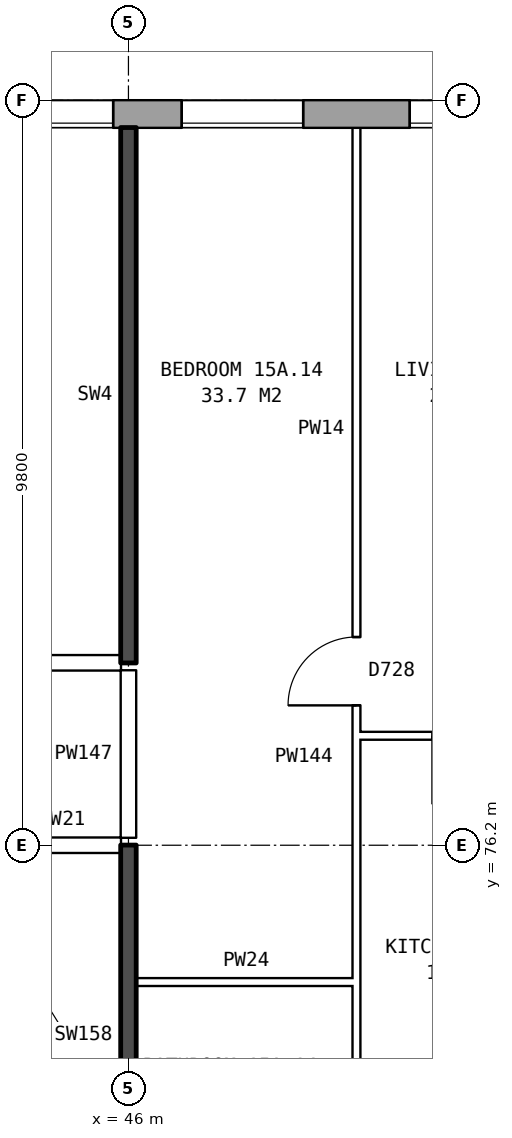
"""IFC4 building model, lengths in metres.
Left out: names, types, materials, properties, quantities, classifications, styles, units other than length and angle.
Written with IfcOpenShell. Run it as: python <this file> out.ifc"""

import sys

from ifc_helpers import new_model, si_unit, direction, frame, frame_2d, origin, place, context, subcontext, project, spatial, rectangle, extrude, element, fill, save


model = new_model("IFC4")
c1 = context("Model", 3, precision=1e-05, world=origin(), true_north=direction((0.0, 1.0)))
c2 = subcontext(c1, "Body", "Model", "MODEL_VIEW")
j1 = project(units=[si_unit("LENGTHUNIT", "METRE"), si_unit("PLANEANGLEUNIT", "RADIAN")], contexts=[c1])
p1 = place(None, origin())
s1 = spatial("IfcSite", under=j1, at=p1, CompositionType="ELEMENT")
p2 = place(p1, origin())
s2 = spatial("IfcBuilding", under=s1, at=p2, CompositionType="ELEMENT")
p3 = place(p2, frame((0.0, 0.0, 56.7)))
s3 = spatial("IfcBuildingStorey", under=s2, at=p3, CompositionType="ELEMENT", Elevation=56.7)
p4 = place(p3, frame((72.925, 85.82, 0.0), z_axis=(0.0, 0.0, 1.0), x_axis=(-1.0, 0.0, 0.0)))
e1 = element("IfcWall", 1, at=p4, inside=s3, PredefinedType="STANDARD", context=c2, shape_type="SweptSolid", body=[
    extrude(rectangle(XDim=48.351, YDim=0.36, at=frame_2d((24.175, 0.0))), origin(), (0.0, 0.0, 1.0), 2.85),
])
p5 = place(p4, frame((0.625, 0.0, 0.8)))
e2 = element("IfcOpeningElement", 2, at=p5, cuts=e1, PredefinedType="OPENING", context=c2, shape_type="SweptSolid", body=[
    extrude(rectangle(XDim=1.6, YDim=1.8, at=frame_2d((0.8, 0.9))), frame((0.0, 0.19, 0.0), z_axis=(0.0, -1.0, 0.0), x_axis=(1.0, 0.0, 0.0)), (0.0, 0.0, 1.0), 0.38),
])
p6 = place(p4, frame((3.625, 0.0, 0.8)))
e3 = element("IfcOpeningElement", 3, at=p6, cuts=e1, PredefinedType="OPENING", context=c2, shape_type="SweptSolid", body=[
    extrude(rectangle(XDim=1.6, YDim=1.8, at=frame_2d((0.8, 0.9))), frame((0.0, 0.19, 0.0), z_axis=(0.0, -1.0, 0.0), x_axis=(1.0, 0.0, 0.0)), (0.0, 0.0, 1.0), 0.38),
])
p7 = place(p4, frame((6.625, 0.0, 0.8)))
e4 = element("IfcOpeningElement", 4, at=p7, cuts=e1, PredefinedType="OPENING", context=c2, shape_type="SweptSolid", body=[
    extrude(rectangle(XDim=1.6, YDim=1.8, at=frame_2d((0.8, 0.9))), frame((0.0, 0.19, 0.0), z_axis=(0.0, -1.0, 0.0), x_axis=(1.0, 0.0, 0.0)), (0.0, 0.0, 1.0), 0.38),
])
p8 = place(p4, frame((9.625, 0.0, 0.8)))
e5 = element("IfcOpeningElement", 5, at=p8, cuts=e1, PredefinedType="OPENING", context=c2, shape_type="SweptSolid", body=[
    extrude(rectangle(XDim=1.6, YDim=1.8, at=frame_2d((0.8, 0.9))), frame((0.0, 0.19, 0.0), z_axis=(0.0, -1.0, 0.0), x_axis=(1.0, 0.0, 0.0)), (0.0, 0.0, 1.0), 0.38),
])
p9 = place(p4, frame((12.625, 0.0, 0.8)))
e6 = element("IfcOpeningElement", 6, at=p9, cuts=e1, PredefinedType="OPENING", context=c2, shape_type="SweptSolid", body=[
    extrude(rectangle(XDim=1.6, YDim=1.8, at=frame_2d((0.8, 0.9))), frame((0.0, 0.19, 0.0), z_axis=(0.0, -1.0, 0.0), x_axis=(1.0, 0.0, 0.0)), (0.0, 0.0, 1.0), 0.38),
])
p10 = place(p4, frame((15.125, 0.0, 0.8)))
e7 = element("IfcOpeningElement", 7, at=p10, cuts=e1, PredefinedType="OPENING", context=c2, shape_type="SweptSolid", body=[
    extrude(rectangle(XDim=1.0, YDim=1.8, at=frame_2d((0.5, 0.9))), frame((0.0, 0.19, 0.0), z_axis=(0.0, -1.0, 0.0), x_axis=(1.0, 0.0, 0.0)), (0.0, 0.0, 1.0), 0.38),
])
p11 = place(p4, frame((18.625, 0.0, 0.65)))
e8 = element("IfcOpeningElement", 8, at=p11, cuts=e1, PredefinedType="OPENING", context=c2, shape_type="SweptSolid", body=[
    extrude(rectangle(XDim=0.8, YDim=0.9, at=frame_2d((0.4, 0.45))), frame((0.0, 0.19, 0.0), z_axis=(0.0, -1.0, 0.0), x_axis=(1.0, 0.0, 0.0)), (0.0, 0.0, 1.0), 0.38),
])
p12 = place(p4, frame((21.625, 0.0, 0.8)))
e9 = element("IfcOpeningElement", 9, at=p12, cuts=e1, PredefinedType="OPENING", context=c2, shape_type="SweptSolid", body=[
    extrude(rectangle(XDim=1.6, YDim=1.8, at=frame_2d((0.8, 0.9))), frame((0.0, 0.19, 0.0), z_axis=(0.0, -1.0, 0.0), x_axis=(1.0, 0.0, 0.0)), (0.0, 0.0, 1.0), 0.38),
])
p13 = place(p4, frame((24.625, 0.0, 0.8)))
e10 = element("IfcOpeningElement", 10, at=p13, cuts=e1, PredefinedType="OPENING", context=c2, shape_type="SweptSolid", body=[
    extrude(rectangle(XDim=1.6, YDim=1.8, at=frame_2d((0.8, 0.9))), frame((0.0, 0.19, 0.0), z_axis=(0.0, -1.0, 0.0), x_axis=(1.0, 0.0, 0.0)), (0.0, 0.0, 1.0), 0.38),
])
p14 = place(p4, frame((27.125, 0.0, 0.8)))
e11 = element("IfcOpeningElement", 11, at=p14, cuts=e1, PredefinedType="OPENING", context=c2, shape_type="SweptSolid", body=[
    extrude(rectangle(XDim=1.0, YDim=1.8, at=frame_2d((0.5, 0.9))), frame((0.0, 0.19, 0.0), z_axis=(0.0, -1.0, 0.0), x_axis=(1.0, 0.0, 0.0)), (0.0, 0.0, 1.0), 0.38),
])
p15 = place(p4, frame((28.425, 0.0, 0.8)))
e12 = element("IfcOpeningElement", 12, at=p15, cuts=e1, PredefinedType="OPENING", context=c2, shape_type="SweptSolid", body=[
    extrude(rectangle(XDim=1.0, YDim=0.9, at=frame_2d((0.5, 0.45))), frame((0.0, 0.19, 0.0), z_axis=(0.0, -1.0, 0.0), x_axis=(1.0, 0.0, 0.0)), (0.0, 0.0, 1.0), 0.38),
])
p16 = place(p4, frame((33.625, 0.0, 0.8)))
e13 = element("IfcOpeningElement", 13, at=p16, cuts=e1, PredefinedType="OPENING", context=c2, shape_type="SweptSolid", body=[
    extrude(rectangle(XDim=1.6, YDim=1.8, at=frame_2d((0.8, 0.9))), frame((0.0, 0.19, 0.0), z_axis=(0.0, -1.0, 0.0), x_axis=(1.0, 0.0, 0.0)), (0.0, 0.0, 1.0), 0.38),
])
p17 = place(p4, frame((36.625, 0.0, 0.8)))
e14 = element("IfcOpeningElement", 14, at=p17, cuts=e1, PredefinedType="OPENING", context=c2, shape_type="SweptSolid", body=[
    extrude(rectangle(XDim=1.6, YDim=1.8, at=frame_2d((0.8, 0.9))), frame((0.0, 0.19, 0.0), z_axis=(0.0, -1.0, 0.0), x_axis=(1.0, 0.0, 0.0)), (0.0, 0.0, 1.0), 0.38),
])
p18 = place(p4, frame((39.625, 0.0, 0.8)))
e15 = element("IfcOpeningElement", 15, at=p18, cuts=e1, PredefinedType="OPENING", context=c2, shape_type="SweptSolid", body=[
    extrude(rectangle(XDim=1.6, YDim=1.8, at=frame_2d((0.8, 0.9))), frame((0.0, 0.19, 0.0), z_axis=(0.0, -1.0, 0.0), x_axis=(1.0, 0.0, 0.0)), (0.0, 0.0, 1.0), 0.38),
])
p19 = place(p4, frame((42.625, 0.0, 0.8)))
e16 = element("IfcOpeningElement", 16, at=p19, cuts=e1, PredefinedType="OPENING", context=c2, shape_type="SweptSolid", body=[
    extrude(rectangle(XDim=1.6, YDim=1.8, at=frame_2d((0.8, 0.9))), frame((0.0, 0.19, 0.0), z_axis=(0.0, -1.0, 0.0), x_axis=(1.0, 0.0, 0.0)), (0.0, 0.0, 1.0), 0.38),
])
p20 = place(p4, frame((45.625, 0.0, 0.8)))
e17 = element("IfcOpeningElement", 17, at=p20, cuts=e1, PredefinedType="OPENING", context=c2, shape_type="SweptSolid", body=[
    extrude(rectangle(XDim=1.6, YDim=1.8, at=frame_2d((0.8, 0.9))), frame((0.0, 0.19, 0.0), z_axis=(0.0, -1.0, 0.0), x_axis=(1.0, 0.0, 0.0)), (0.0, 0.0, 1.0), 0.38),
])
p21 = place(p4, frame((16.425, 0.0, 1.7)))
e18 = element("IfcOpeningElement", 18, at=p21, cuts=e1, PredefinedType="OPENING", context=c2, shape_type="SweptSolid", body=[
    extrude(rectangle(XDim=1.0, YDim=0.9, at=frame_2d((0.5, 0.45))), frame((0.0, 0.19, 0.0), z_axis=(0.0, -1.0, 0.0), x_axis=(1.0, 0.0, 0.0)), (0.0, 0.0, 1.0), 0.38),
])
p22 = place(p4, frame((19.725, 0.0, 0.75)))
e19 = element("IfcOpeningElement", 19, at=p22, cuts=e1, PredefinedType="OPENING", context=c2, shape_type="SweptSolid", body=[
    extrude(rectangle(XDim=1.0, YDim=1.5, at=frame_2d((0.5, 0.75))), frame((0.0, 0.19, 0.0), z_axis=(0.0, -1.0, 0.0), x_axis=(1.0, 0.0, 0.0)), (0.0, 0.0, 1.0), 0.38),
])
p23 = place(p4, frame((30.875, 0.0, 1.7)))
e20 = element("IfcOpeningElement", 20, at=p23, cuts=e1, PredefinedType="OPENING", context=c2, shape_type="SweptSolid", body=[
    extrude(rectangle(XDim=0.6, YDim=0.9, at=frame_2d((0.3, 0.45))), frame((0.0, 0.19, 0.0), z_axis=(0.0, -1.0, 0.0), x_axis=(1.0, 0.0, 0.0)), (0.0, 0.0, 1.0), 0.38),
])
p24 = place(p4, frame((31.775, 0.0, 1.1)))
e21 = element("IfcOpeningElement", 21, at=p24, cuts=e1, PredefinedType="OPENING", context=c2, shape_type="SweptSolid", body=[
    extrude(rectangle(XDim=0.8, YDim=1.5, at=frame_2d((0.4, 0.75))), frame((0.0, 0.19, 0.0), z_axis=(0.0, -1.0, 0.0), x_axis=(1.0, 0.0, 0.0)), (0.0, 0.0, 1.0), 0.38),
])
p25 = place(p3, frame((46.1, 74.4, 0.0), z_axis=(0.0, 0.0, 1.0), x_axis=(1.0, 0.0, 0.0)))
e22 = element("IfcWall", 22, at=p25, inside=s3, PredefinedType="PARTITIONING", context=c2, shape_type="SweptSolid", body=[
    extrude(rectangle(XDim=2.9, YDim=0.1, at=frame_2d((1.45, 0.0))), origin(), (0.0, 0.0, 1.0), 2.85),
])
p26 = place(p3, frame((44.36, 76.2, 0.0), z_axis=(0.0, 0.0, 1.0), x_axis=(1.0, 0.0, 0.0)))
e23 = element("IfcWall", 23, at=p26, inside=s3, PredefinedType="PARTITIONING", context=c2, shape_type="SweptSolid", body=[
    extrude(rectangle(XDim=1.54, YDim=0.2, at=frame_2d((0.77, 0.0))), origin(), (0.0, 0.0, 1.0), 2.85),
])
p27 = place(p3, frame((49.0, 77.64, 0.0), z_axis=(0.0, 0.0, 1.0), x_axis=(1.0, 0.0, 0.0)))
e24 = element("IfcWall", 24, at=p27, inside=s3, PredefinedType="PARTITIONING", context=c2, shape_type="SweptSolid", body=[
    extrude(rectangle(XDim=2.9, YDim=0.1, at=frame_2d((1.45, 0.0))), origin(), (0.0, 0.0, 1.0), 2.85),
])
p28 = place(p27, frame((1.0, 0.0, 0.0)))
e25 = element("IfcOpeningElement", 25, at=p28, cuts=e24, PredefinedType="OPENING", context=c2, shape_type="SweptSolid", body=[
    extrude(rectangle(XDim=0.9, YDim=2.1, at=frame_2d((0.45, 1.05))), frame((0.0, 0.06, 0.0), z_axis=(0.0, -1.0, 0.0), x_axis=(1.0, 0.0, 0.0)), (0.0, 0.0, 1.0), 0.12),
])
p29 = place(p3, frame((21.86, 78.6, 0.0), z_axis=(0.0, 0.0, 1.0), x_axis=(1.0, 0.0, 0.0)))
e26 = element("IfcWall", 26, at=p29, inside=s3, PredefinedType="PARTITIONING", context=c2, shape_type="SweptSolid", body=[
    extrude(rectangle(XDim=24.04, YDim=0.2, at=frame_2d((12.02, 0.0))), origin(), (0.0, 0.0, 1.0), 2.85),
])
p30 = place(p29, frame((20.59, 0.0, 0.0)))
e27 = element("IfcOpeningElement", 27, at=p30, cuts=e26, PredefinedType="OPENING", context=c2, shape_type="SweptSolid", body=[
    extrude(rectangle(XDim=1.0, YDim=2.1, at=frame_2d((0.5, 1.05))), frame((0.0, 0.11, 0.0), z_axis=(0.0, -1.0, 0.0), x_axis=(1.0, 0.0, 0.0)), (0.0, 0.0, 1.0), 0.22),
])
p31 = place(p29, frame((8.64, 0.0, 0.0)))
e28 = element("IfcOpeningElement", 28, at=p31, cuts=e26, PredefinedType="OPENING", context=c2, shape_type="SweptSolid", body=[
    extrude(rectangle(XDim=1.0, YDim=2.1, at=frame_2d((0.5, 1.05))), frame((0.0, 0.11, 0.0), z_axis=(0.0, -1.0, 0.0), x_axis=(1.0, 0.0, 0.0)), (0.0, 0.0, 1.0), 0.22),
])
p32 = place(p29, frame((3.64, 0.0, 0.0)))
e29 = element("IfcOpeningElement", 29, at=p32, cuts=e26, PredefinedType="OPENING", context=c2, shape_type="SweptSolid", body=[
    extrude(rectangle(XDim=1.0, YDim=2.1, at=frame_2d((0.5, 1.05))), frame((0.0, 0.11, 0.0), z_axis=(0.0, -1.0, 0.0), x_axis=(1.0, 0.0, 0.0)), (0.0, 0.0, 1.0), 0.22),
])
p33 = place(p3, frame((46.0, 71.2, 0.0), z_axis=(0.0, 0.0, 1.0), x_axis=(0.0, 1.0, 0.0)))
e30 = element("IfcWall", 30, at=p33, inside=s3, PredefinedType="SOLIDWALL", context=c2, shape_type="SweptSolid", body=[
    extrude(rectangle(XDim=5.0, YDim=0.2, at=frame_2d((2.5, 0.0))), origin(), (0.0, 0.0, 1.0), 2.85),
])
p34 = place(p3, frame((46.0, 76.3, 0.0), z_axis=(0.0, 0.0, 1.0), x_axis=(0.0, 1.0, 0.0)))
e31 = element("IfcWall", 31, at=p34, inside=s3, PredefinedType="PARTITIONING", context=c2, shape_type="SweptSolid", body=[
    extrude(rectangle(XDim=2.2, YDim=0.2, at=frame_2d((1.1, 0.0))), origin(), (0.0, 0.0, 1.0), 2.85),
])
p35 = place(p3, frame((46.0, 78.6, 0.0), z_axis=(0.0, 0.0, 1.0), x_axis=(0.0, 1.0, 0.0)))
e32 = element("IfcWall", 32, at=p35, inside=s3, PredefinedType="SOLIDWALL", context=c2, shape_type="SweptSolid", body=[
    extrude(rectangle(XDim=7.04, YDim=0.2, at=frame_2d((3.52, 0.0))), origin(), (0.0, 0.0, 1.0), 2.85),
])
p36 = place(p3, frame((49.0, 71.3, 0.0), z_axis=(0.0, 0.0, 1.0), x_axis=(0.0, 1.0, 0.0)))
e33 = element("IfcWall", 33, at=p36, inside=s3, PredefinedType="PARTITIONING", context=c2, shape_type="SweptSolid", body=[
    extrude(rectangle(XDim=14.34, YDim=0.1, at=frame_2d((7.17, 0.0))), origin(), (0.0, 0.0, 1.0), 2.85),
])
p37 = place(p36, frame((6.74, 0.0, 0.0)))
e34 = element("IfcOpeningElement", 34, at=p37, cuts=e33, PredefinedType="OPENING", context=c2, shape_type="SweptSolid", body=[
    extrude(rectangle(XDim=0.9, YDim=2.1, at=frame_2d((0.45, 1.05))), frame((0.0, 0.06, 0.0), z_axis=(0.0, -1.0, 0.0), x_axis=(1.0, 0.0, 0.0)), (0.0, 0.0, 1.0), 0.12),
])
p38 = place(p36, frame((0.4, 0.0, 0.0)))
e35 = element("IfcOpeningElement", 35, at=p38, cuts=e33, PredefinedType="OPENING", context=c2, shape_type="SweptSolid", body=[
    extrude(rectangle(XDim=0.9, YDim=2.1, at=frame_2d((0.45, 1.05))), frame((0.0, 0.06, 0.0), z_axis=(0.0, -1.0, 0.0), x_axis=(1.0, 0.0, 0.0)), (0.0, 0.0, 1.0), 0.12),
])
p39 = place(p12, origin())
e36 = element("IfcWindow", 36, at=p39, inside=s3, PartitioningType="SINGLE_PANEL", PredefinedType="WINDOW", context=c2, shape_type="SweptSolid", body=[
    extrude(rectangle(XDim=1.6, YDim=1.8, at=frame_2d((0.8, 0.9))), frame((0.0, 0.15, 0.0), z_axis=(0.0, -1.0, 0.0), x_axis=(1.0, 0.0, 0.0)), (0.0, 0.0, 1.0), 0.06),
])
fill(e9, e36)
p40 = place(p13, origin())
e37 = element("IfcWindow", 37, at=p40, inside=s3, PartitioningType="SINGLE_PANEL", PredefinedType="WINDOW", context=c2, shape_type="SweptSolid", body=[
    extrude(rectangle(XDim=1.6, YDim=1.8, at=frame_2d((0.8, 0.9))), frame((0.0, 0.15, 0.0), z_axis=(0.0, -1.0, 0.0), x_axis=(1.0, 0.0, 0.0)), (0.0, 0.0, 1.0), 0.06),
])
fill(e10, e37)
p41 = place(p14, origin())
e38 = element("IfcWindow", 38, at=p41, inside=s3, PartitioningType="SINGLE_PANEL", PredefinedType="WINDOW", context=c2, shape_type="SweptSolid", body=[
    extrude(rectangle(XDim=1.0, YDim=1.8, at=frame_2d((0.5, 0.9))), frame((0.0, 0.15, 0.0), z_axis=(0.0, -1.0, 0.0), x_axis=(1.0, 0.0, 0.0)), (0.0, 0.0, 1.0), 0.06),
])
fill(e11, e38)
p42 = place(p37, origin())
e39 = element("IfcDoor", 39, at=p42, inside=s3, OperationType="SINGLE_SWING_LEFT", PredefinedType="DOOR", context=c2, shape_type="SweptSolid", body=[
    extrude(rectangle(XDim=0.9, YDim=2.1, at=frame_2d((0.45, 1.05))), frame((0.0, 0.025, 0.0), z_axis=(0.0, -1.0, 0.0), x_axis=(1.0, 0.0, 0.0)), (0.0, 0.0, 1.0), 0.05),
])
fill(e34, e39)
save(model, sys.argv[1])
